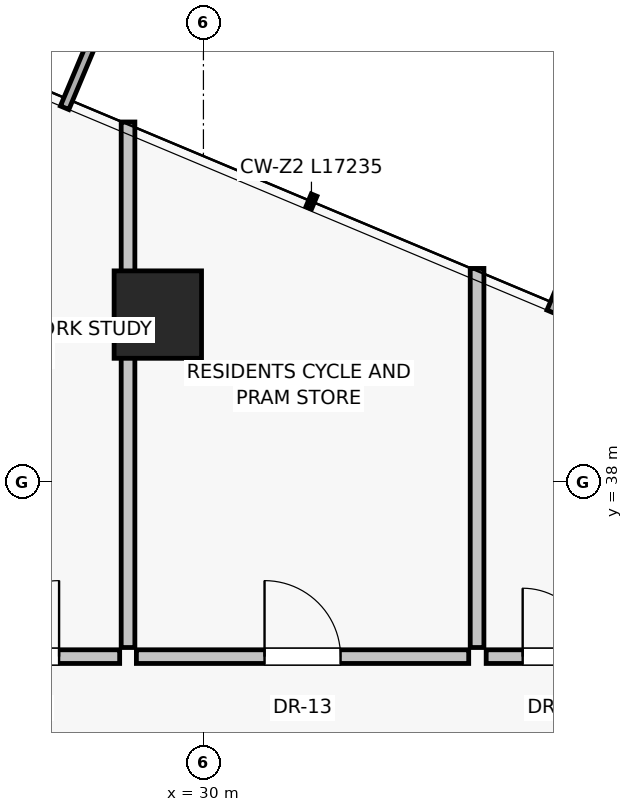
"""IFC4 building model, lengths in metres.
Left out: names, types, materials, properties, quantities, classifications, styles, units other than length and angle.
Written with IfcOpenShell. Run it as: python <this file> out.ifc"""

import sys

from ifc_helpers import new_model, si_unit, direction, frame, frame_2d, origin, origin_2d, place, context, subcontext, project, spatial, rectangle, extrude, source, transform, mapped, element, fill, save


model = new_model("IFC4")
c1 = context("Model", 3, precision=1e-05, world=origin(), true_north=direction((0.0, 1.0)))
c2 = subcontext(c1, "Body", "Model", "MODEL_VIEW")
j1 = project(units=[si_unit("LENGTHUNIT", "METRE"), si_unit("PLANEANGLEUNIT", "RADIAN")], contexts=[c1])
p1 = place(None, origin())
s1 = spatial("IfcSite", under=j1, at=p1, CompositionType="ELEMENT")
p2 = place(p1, origin())
s2 = spatial("IfcBuilding", under=s1, at=p2, CompositionType="ELEMENT")
p3 = place(p2, frame((0.0, 0.0, 152.25)))
s3 = spatial("IfcBuildingStorey", under=s2, at=p3, CompositionType="ELEMENT", Elevation=152.25)
p4 = place(p3, frame((29.4, 40.2, 0.0), z_axis=(0.0, 0.0, 1.0), x_axis=(1.0, 0.0, 0.0)))
e1 = element("IfcColumn", 1, at=p4, inside=s3, PredefinedType="COLUMN", context=c2, shape_type="SweptSolid", body=[
    extrude(rectangle(XDim=1.15, YDim=1.15, at=origin_2d()), origin(), (0.0, 0.0, 1.0), 3.25),
])
p5 = place(p3, frame((33.6, 35.82, 0.0), z_axis=(0.0, 0.0, 1.0), x_axis=(0.0, 1.0, 0.0)))
e2 = element("IfcWall", 2, at=p5, inside=s3, PredefinedType="PARTITIONING", context=c2, shape_type="SweptSolid", body=[
    extrude(rectangle(XDim=4.987, YDim=0.18, at=frame_2d((2.494, 0.0))), origin(), (0.0, 0.0, 1.0), 3.0),
])
p6 = place(p3, frame((26.304, 35.7, 0.0), z_axis=(0.0, 0.0, 1.0), x_axis=(1.0, 0.0, 0.0)))
e3 = element("IfcWall", 3, at=p6, inside=s3, PredefinedType="PARTITIONING", context=c2, shape_type="SweptSolid", body=[
    extrude(rectangle(XDim=2.594, YDim=0.18, at=frame_2d((1.297, 0.0))), origin(), (0.0, 0.0, 1.0), 2.58),
])
p7 = place(p6, frame((0.797, 0.0, 0.0)))
e4 = element("IfcOpeningElement", 4, at=p7, cuts=e3, PredefinedType="OPENING", context=c2, shape_type="SweptSolid", body=[
    extrude(rectangle(XDim=1.0, YDim=2.01, at=frame_2d((0.5, 1.005))), frame((0.0, 0.1, 0.0), z_axis=(0.0, -1.0, 0.0), x_axis=(1.0, 0.0, 0.0)), (0.0, 0.0, 1.0), 0.2),
])
p8 = place(p3, frame((29.118, 35.7, 0.0), z_axis=(0.0, 0.0, 1.0), x_axis=(1.0, 0.0, 0.0)))
e5 = element("IfcWall", 5, at=p8, inside=s3, PredefinedType="PARTITIONING", context=c2, shape_type="SweptSolid", body=[
    extrude(rectangle(XDim=4.372, YDim=0.18, at=frame_2d((2.186, 0.0))), origin(), (0.0, 0.0, 1.0), 2.58),
])
p9 = place(p8, frame((1.686, 0.0, 0.0)))
e6 = element("IfcOpeningElement", 6, at=p9, cuts=e5, PredefinedType="OPENING", context=c2, shape_type="SweptSolid", body=[
    extrude(rectangle(XDim=1.0, YDim=2.01, at=frame_2d((0.5, 1.005))), frame((0.0, 0.1, 0.0), z_axis=(0.0, -1.0, 0.0), x_axis=(1.0, 0.0, 0.0)), (0.0, 0.0, 1.0), 0.2),
])
p10 = place(p3, frame((29.008, 35.82, 0.0), z_axis=(0.0, 0.0, 1.0), x_axis=(0.0, 1.0, 0.0)))
e7 = element("IfcWall", 7, at=p10, inside=s3, PredefinedType="PARTITIONING", context=c2, shape_type="SweptSolid", body=[
    extrude(rectangle(XDim=6.914, YDim=0.18, at=frame_2d((3.457, 0.0))), origin(), (0.0, 0.0, 1.0), 2.378),
])
p11 = place(p3, frame((33.72, 35.7, 0.0), z_axis=(0.0, 0.0, 1.0), x_axis=(1.0, 0.0, 0.0)))
e8 = element("IfcWall", 8, at=p11, inside=s3, PredefinedType="PARTITIONING", context=c2, shape_type="SweptSolid", body=[
    extrude(rectangle(XDim=1.86, YDim=0.18, at=frame_2d((0.93, 0.0))), origin(), (0.0, 0.0, 1.0), 3.0),
])
p12 = place(p11, frame((0.48, 0.0, 0.0)))
e9 = element("IfcOpeningElement", 9, at=p12, cuts=e8, PredefinedType="OPENING", context=c2, shape_type="SweptSolid", body=[
    extrude(rectangle(XDim=0.9, YDim=2.01, at=frame_2d((0.45, 1.005))), frame((0.0, 0.1, 0.0), z_axis=(0.0, -1.0, 0.0), x_axis=(1.0, 0.0, 0.0)), (0.0, 0.0, 1.0), 0.2),
])
m1 = source(origin(), c2, "Body", "SweptSolid", [
    extrude(rectangle(XDim=1.0, YDim=2.01, at=frame_2d((0.5, 1.005))), frame((0.0, 0.025, 0.0), z_axis=(0.0, -1.0, 0.0), x_axis=(1.0, 0.0, 0.0)), (0.0, 0.0, 1.0), 0.05),
])
p13 = place(p7, origin())
e10 = element("IfcDoor", 10, at=p13, inside=s3, OperationType="SINGLE_SWING_RIGHT", PredefinedType="DOOR", context=c2, shape_type="MappedRepresentation", body=[
    mapped(m1, transform((0.0, 0.0, 0.0), scale=1.0)),
])
fill(e4, e10)
p14 = place(p9, origin())
e11 = element("IfcDoor", 11, at=p14, inside=s3, OperationType="SINGLE_SWING_LEFT", PredefinedType="DOOR", context=c2, shape_type="MappedRepresentation", body=[
    mapped(m1, transform((0.0, 0.0, 0.0), scale=1.0)),
])
fill(e6, e11)
m2 = source(origin(), c2, "Body", "SweptSolid", [
    extrude(rectangle(XDim=0.9, YDim=2.01, at=frame_2d((0.45, 1.005))), frame((0.0, 0.025, 0.0), z_axis=(0.0, -1.0, 0.0), x_axis=(1.0, 0.0, 0.0)), (0.0, 0.0, 1.0), 0.05),
])
p15 = place(p12, origin())
e12 = element("IfcDoor", 12, at=p15, inside=s3, OperationType="SINGLE_SWING_LEFT", PredefinedType="DOOR", context=c2, shape_type="MappedRepresentation", body=[
    mapped(m2, transform((0.0, 0.0, 0.0), scale=1.0)),
])
fill(e9, e12)
save(model, sys.argv[1])
